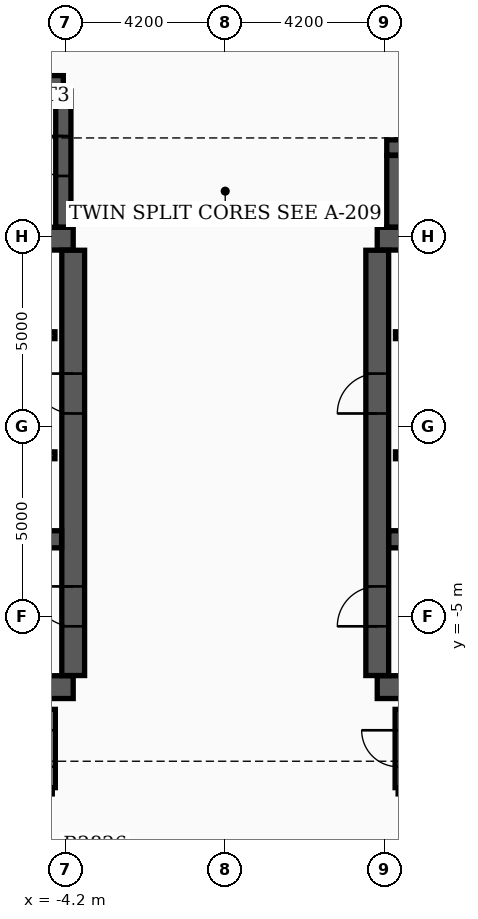
"""IFC4 building model, lengths in metres.
Left out: names, types, materials, properties, quantities, classifications, styles, units other than length and angle.
Written with IfcOpenShell. Run it as: python <this file> out.ifc"""

import sys

from ifc_helpers import new_model, si_unit, direction, frame, frame_2d, origin, place, context, subcontext, project, spatial, rectangle, extrude, element, fill, save


model = new_model("IFC4")
c1 = context("Model", 3, precision=1e-05, world=origin(), true_north=direction((0.0, 1.0)))
c2 = subcontext(c1, "Body", "Model", "MODEL_VIEW")
j1 = project(units=[si_unit("LENGTHUNIT", "METRE"), si_unit("PLANEANGLEUNIT", "RADIAN")], contexts=[c1])
p1 = place(None, origin())
s1 = spatial("IfcSite", under=j1, at=p1, CompositionType="ELEMENT")
p2 = place(p1, origin())
s2 = spatial("IfcBuilding", under=s1, at=p2, CompositionType="ELEMENT")
p3 = place(p2, frame((0.0, 0.0, 176.1)))
s3 = spatial("IfcBuildingStorey", under=s2, at=p3, CompositionType="ELEMENT", Elevation=176.1)
for number, where, z_axis, x_axis in (
    (1, (-12.4, -6.85, 0.0), (0.0, 0.0, 1.0), (1.0, 0.0, 0.0)),
    (2, (-12.4, 4.95, 0.0), (0.0, 0.0, 1.0), (1.0, 0.0, 0.0)),
):
    element("IfcWall", number, at=place(p3, frame(where, z_axis=z_axis, x_axis=x_axis)), inside=s3, PredefinedType="SHEAR", context=c2, shape_type="SweptSolid", body=[
        extrude(rectangle(XDim=8.4, YDim=0.6, at=frame_2d((4.2, 0.0))), origin(), (0.0, 0.0, 1.0), 3.7),
    ])
p4 = place(p3, frame((-4.0, -6.545, 0.0), z_axis=(0.0, 0.0, 1.0), x_axis=(0.0, 1.0, 0.0)))
e3 = element("IfcWall", 3, at=p4, inside=s3, PredefinedType="SHEAR", context=c2, shape_type="SweptSolid", body=[
    extrude(rectangle(XDim=11.19, YDim=0.6, at=frame_2d((5.595, 0.0))), origin(), (0.0, 0.0, 1.0), 3.7),
])
p5 = place(p4, frame((1.295, 0.0, 0.0)))
e4 = element("IfcOpeningElement", 4, at=p5, cuts=e3, PredefinedType="OPENING", context=c2, shape_type="SweptSolid", body=[
    extrude(rectangle(XDim=1.05, YDim=2.15, at=frame_2d((0.525, 1.075))), frame((0.0, 0.31, 0.0), z_axis=(0.0, -1.0, 0.0), x_axis=(1.0, 0.0, 0.0)), (0.0, 0.0, 1.0), 0.62),
])
p6 = place(p4, frame((6.895, 0.0, 0.0)))
e5 = element("IfcOpeningElement", 5, at=p6, cuts=e3, PredefinedType="OPENING", context=c2, shape_type="SweptSolid", body=[
    extrude(rectangle(XDim=1.05, YDim=2.15, at=frame_2d((0.525, 1.075))), frame((0.0, 0.31, 0.0), z_axis=(0.0, -1.0, 0.0), x_axis=(1.0, 0.0, 0.0)), (0.0, 0.0, 1.0), 0.62),
])
p7 = place(p3, frame((-12.095, -2.96, 0.0), z_axis=(0.0, 0.0, 1.0), x_axis=(1.0, 0.0, 0.0)))
e6 = element("IfcWall", 6, at=p7, inside=s3, PredefinedType="SHEAR", context=c2, shape_type="SweptSolid", body=[
    extrude(rectangle(XDim=7.79, YDim=0.45, at=frame_2d((3.895, 0.0))), origin(), (0.0, 0.0, 1.0), 3.7),
])
for number, where, z_axis, x_axis in (
    (7, (4.0, -6.85, 0.0), (0.0, 0.0, 1.0), (1.0, 0.0, 0.0)),
    (8, (4.0, 4.95, 0.0), (0.0, 0.0, 1.0), (1.0, 0.0, 0.0)),
):
    element("IfcWall", number, at=place(p3, frame(where, z_axis=z_axis, x_axis=x_axis)), inside=s3, PredefinedType="SHEAR", context=c2, shape_type="SweptSolid", body=[
        extrude(rectangle(XDim=8.4, YDim=0.6, at=frame_2d((4.2, 0.0))), origin(), (0.0, 0.0, 1.0), 3.7),
    ])
p8 = place(p3, frame((4.0, -6.545, 0.0), z_axis=(0.0, 0.0, 1.0), x_axis=(0.0, 1.0, 0.0)))
e9 = element("IfcWall", 9, at=p8, inside=s3, PredefinedType="SHEAR", context=c2, shape_type="SweptSolid", body=[
    extrude(rectangle(XDim=11.19, YDim=0.6, at=frame_2d((5.595, 0.0))), origin(), (0.0, 0.0, 1.0), 3.7),
])
p9 = place(p8, frame((1.295, 0.0, 0.0)))
e10 = element("IfcOpeningElement", 10, at=p9, cuts=e9, PredefinedType="OPENING", context=c2, shape_type="SweptSolid", body=[
    extrude(rectangle(XDim=1.05, YDim=2.15, at=frame_2d((0.525, 1.075))), frame((0.0, 0.31, 0.0), z_axis=(0.0, -1.0, 0.0), x_axis=(1.0, 0.0, 0.0)), (0.0, 0.0, 1.0), 0.62),
])
p10 = place(p8, frame((6.895, 0.0, 0.0)))
e11 = element("IfcOpeningElement", 11, at=p10, cuts=e9, PredefinedType="OPENING", context=c2, shape_type="SweptSolid", body=[
    extrude(rectangle(XDim=1.05, YDim=2.15, at=frame_2d((0.525, 1.075))), frame((0.0, 0.31, 0.0), z_axis=(0.0, -1.0, 0.0), x_axis=(1.0, 0.0, 0.0)), (0.0, 0.0, 1.0), 0.62),
])
p11 = place(p3, frame((4.305, -2.96, 0.0), z_axis=(0.0, 0.0, 1.0), x_axis=(1.0, 0.0, 0.0)))
e12 = element("IfcWall", 12, at=p11, inside=s3, PredefinedType="SHEAR", context=c2, shape_type="SweptSolid", body=[
    extrude(rectangle(XDim=7.79, YDim=0.45, at=frame_2d((3.895, 0.0))), origin(), (0.0, 0.0, 1.0), 3.7),
])
p12 = place(p3, frame((-12.22, 9.04, 0.0), z_axis=(0.0, 0.0, 1.0), x_axis=(1.0, 0.0, 0.0)))
e13 = element("IfcWall", 13, at=p12, inside=s3, PredefinedType="SHEAR", context=c2, shape_type="SweptSolid", body=[
    extrude(rectangle(XDim=7.96, YDim=0.4, at=frame_2d((3.98, 0.0))), origin(), (0.0, 0.0, 1.0), 3.7),
])
p13 = place(p3, frame((-4.26, 5.255, 0.0), z_axis=(0.0, 0.0, 1.0), x_axis=(0.0, 1.0, 0.0)))
e14 = element("IfcWall", 14, at=p13, inside=s3, PredefinedType="SHEAR", context=c2, shape_type="SweptSolid", body=[
    extrude(rectangle(XDim=3.58, YDim=0.4, at=frame_2d((1.79, 0.0))), origin(), (0.0, 0.0, 1.0), 3.7),
])
p14 = place(p13, frame((1.345, 0.0, 0.0)))
e15 = element("IfcOpeningElement", 15, at=p14, cuts=e14, PredefinedType="OPENING", context=c2, shape_type="SweptSolid", body=[
    extrude(rectangle(XDim=1.05, YDim=2.15, at=frame_2d((0.525, 1.075))), frame((0.0, 0.21, 0.0), z_axis=(0.0, -1.0, 0.0), x_axis=(1.0, 0.0, 0.0)), (0.0, 0.0, 1.0), 0.42),
])
p15 = place(p3, frame((4.45, 5.255, 0.0), z_axis=(0.0, 0.0, 1.0), x_axis=(0.0, 1.0, 0.0)))
e16 = element("IfcWall", 16, at=p15, inside=s3, PredefinedType="SHEAR", context=c2, shape_type="SweptSolid", body=[
    extrude(rectangle(XDim=1.885, YDim=0.4, at=frame_2d((0.942, 0.0))), origin(), (0.0, 0.0, 1.0), 3.7),
])
p16 = place(p3, frame((4.25, 7.35, 0.0), z_axis=(0.0, 0.0, 1.0), x_axis=(1.0, 0.0, 0.0)))
e17 = element("IfcWall", 17, at=p16, inside=s3, PredefinedType="SHEAR", context=c2, shape_type="SweptSolid", body=[
    extrude(rectangle(XDim=5.4, YDim=0.4, at=frame_2d((2.7, 0.0))), origin(), (0.0, 0.0, 1.0), 3.7),
])
p17 = place(p3, frame((-11.9, 2.41, 0.0), z_axis=(0.0, 0.0, 1.0), x_axis=(1.0, 0.0, 0.0)))
e18 = element("IfcWall", 18, at=p17, inside=s3, PredefinedType="SOLIDWALL", context=c2, shape_type="SweptSolid", body=[
    extrude(rectangle(XDim=7.42, YDim=0.18, at=frame_2d((3.71, 0.0))), origin(), (0.0, 0.0, 1.0), 2.96),
])
p18 = place(p17, frame((0.55, 0.0, 0.0)))
e19 = element("IfcOpeningElement", 19, at=p18, cuts=e18, PredefinedType="OPENING", context=c2, shape_type="SweptSolid", body=[
    extrude(rectangle(XDim=1.1, YDim=2.15, at=frame_2d((0.55, 1.075))), frame((0.0, 0.1, 0.0), z_axis=(0.0, -1.0, 0.0), x_axis=(1.0, 0.0, 0.0)), (0.0, 0.0, 1.0), 0.2),
])
p19 = place(p17, frame((4.9, 0.0, 0.0)))
e20 = element("IfcOpeningElement", 20, at=p19, cuts=e18, PredefinedType="OPENING", context=c2, shape_type="SweptSolid", body=[
    extrude(rectangle(XDim=0.88, YDim=2.1, at=frame_2d((0.44, 1.05))), frame((0.0, 0.1, 0.0), z_axis=(0.0, -1.0, 0.0), x_axis=(1.0, 0.0, 0.0)), (0.0, 0.0, 1.0), 0.2),
])
p20 = place(p3, frame((4.48, 2.41, 0.0), z_axis=(0.0, 0.0, 1.0), x_axis=(1.0, 0.0, 0.0)))
e21 = element("IfcWall", 21, at=p20, inside=s3, PredefinedType="SOLIDWALL", context=c2, shape_type="SweptSolid", body=[
    extrude(rectangle(XDim=7.42, YDim=0.18, at=frame_2d((3.71, 0.0))), origin(), (0.0, 0.0, 1.0), 2.96),
])
p21 = place(p20, frame((5.67, 0.0, 0.0)))
e22 = element("IfcOpeningElement", 22, at=p21, cuts=e21, PredefinedType="OPENING", context=c2, shape_type="SweptSolid", body=[
    extrude(rectangle(XDim=1.1, YDim=2.15, at=frame_2d((0.55, 1.075))), frame((0.0, 0.1, 0.0), z_axis=(0.0, -1.0, 0.0), x_axis=(1.0, 0.0, 0.0)), (0.0, 0.0, 1.0), 0.2),
])
p22 = place(p20, frame((1.6, 0.0, 0.0)))
e23 = element("IfcOpeningElement", 23, at=p22, cuts=e21, PredefinedType="OPENING", context=c2, shape_type="SweptSolid", body=[
    extrude(rectangle(XDim=0.88, YDim=2.1, at=frame_2d((0.44, 1.05))), frame((0.0, 0.1, 0.0), z_axis=(0.0, -1.0, 0.0), x_axis=(1.0, 0.0, 0.0)), (0.0, 0.0, 1.0), 0.2),
])
p23 = place(p3, frame((-11.9, -0.75, 0.0), z_axis=(0.0, 0.0, 1.0), x_axis=(1.0, 0.0, 0.0)))
e24 = element("IfcWall", 24, at=p23, inside=s3, PredefinedType="SOLIDWALL", context=c2, shape_type="SweptSolid", body=[
    extrude(rectangle(XDim=7.42, YDim=0.18, at=frame_2d((3.71, 0.0))), origin(), (0.0, 0.0, 1.0), 2.96),
])
p24 = place(p23, frame((0.45, 0.0, 0.0)))
e25 = element("IfcOpeningElement", 25, at=p24, cuts=e24, PredefinedType="OPENING", context=c2, shape_type="SweptSolid", body=[
    extrude(rectangle(XDim=1.1, YDim=2.15, at=frame_2d((0.55, 1.075))), frame((0.0, 0.1, 0.0), z_axis=(0.0, -1.0, 0.0), x_axis=(1.0, 0.0, 0.0)), (0.0, 0.0, 1.0), 0.2),
])
p25 = place(p23, frame((2.35, 0.0, 0.0)))
e26 = element("IfcOpeningElement", 26, at=p25, cuts=e24, PredefinedType="OPENING", context=c2, shape_type="SweptSolid", body=[
    extrude(rectangle(XDim=1.1, YDim=2.15, at=frame_2d((0.55, 1.075))), frame((0.0, 0.1, 0.0), z_axis=(0.0, -1.0, 0.0), x_axis=(1.0, 0.0, 0.0)), (0.0, 0.0, 1.0), 0.2),
])
p26 = place(p3, frame((4.48, -0.75, 0.0), z_axis=(0.0, 0.0, 1.0), x_axis=(1.0, 0.0, 0.0)))
e27 = element("IfcWall", 27, at=p26, inside=s3, PredefinedType="SOLIDWALL", context=c2, shape_type="SweptSolid", body=[
    extrude(rectangle(XDim=7.42, YDim=0.18, at=frame_2d((3.71, 0.0))), origin(), (0.0, 0.0, 1.0), 2.96),
])
p27 = place(p26, frame((0.52, 0.0, 0.0)))
e28 = element("IfcOpeningElement", 28, at=p27, cuts=e27, PredefinedType="OPENING", context=c2, shape_type="SweptSolid", body=[
    extrude(rectangle(XDim=1.1, YDim=2.15, at=frame_2d((0.55, 1.075))), frame((0.0, 0.1, 0.0), z_axis=(0.0, -1.0, 0.0), x_axis=(1.0, 0.0, 0.0)), (0.0, 0.0, 1.0), 0.2),
])
p28 = place(p3, frame((4.55, -9.58, 0.0), z_axis=(0.0, 0.0, 1.0), x_axis=(1.0, 0.0, 0.0)))
e29 = element("IfcWall", 29, at=p28, inside=s3, PredefinedType="PARTITIONING", context=c2, shape_type="SweptSolid", body=[
    extrude(rectangle(XDim=8.1, YDim=0.16, at=frame_2d((4.05, 0.0))), origin(), (0.0, 0.0, 1.0), 2.96),
])
p29 = place(p3, frame((4.55, -9.495, 0.0), z_axis=(0.0, 0.0, 1.0), x_axis=(0.0, 1.0, 0.0)))
e30 = element("IfcWall", 30, at=p29, inside=s3, PredefinedType="PARTITIONING", context=c2, shape_type="SweptSolid", body=[
    extrude(rectangle(XDim=2.06, YDim=0.16, at=frame_2d((1.03, 0.0))), origin(), (0.0, 0.0, 1.0), 2.96),
])
p30 = place(p29, frame((0.55, 0.0, 0.0)))
e31 = element("IfcOpeningElement", 31, at=p30, cuts=e30, PredefinedType="OPENING", context=c2, shape_type="SweptSolid", body=[
    extrude(rectangle(XDim=0.96, YDim=2.15, at=frame_2d((0.48, 1.075))), frame((0.0, 0.09, 0.0), z_axis=(0.0, -1.0, 0.0), x_axis=(1.0, 0.0, 0.0)), (0.0, 0.0, 1.0), 0.18),
])
p31 = place(p3, frame((-4.55, -9.495, 0.0), z_axis=(0.0, 0.0, 1.0), x_axis=(0.0, 1.0, 0.0)))
e32 = element("IfcWall", 32, at=p31, inside=s3, PredefinedType="PARTITIONING", context=c2, shape_type="SweptSolid", body=[
    extrude(rectangle(XDim=2.06, YDim=0.16, at=frame_2d((1.03, 0.0))), origin(), (0.0, 0.0, 1.0), 2.96),
])
p32 = place(p31, frame((0.55, 0.0, 0.0)))
e33 = element("IfcOpeningElement", 33, at=p32, cuts=e32, PredefinedType="OPENING", context=c2, shape_type="SweptSolid", body=[
    extrude(rectangle(XDim=0.96, YDim=2.15, at=frame_2d((0.48, 1.075))), frame((0.0, 0.09, 0.0), z_axis=(0.0, -1.0, 0.0), x_axis=(1.0, 0.0, 0.0)), (0.0, 0.0, 1.0), 0.18),
])
p33 = place(p5, origin())
e34 = element("IfcDoor", 34, at=p33, inside=s3, OperationType="SINGLE_SWING_RIGHT", PredefinedType="DOOR", context=c2, shape_type="SweptSolid", body=[
    extrude(rectangle(XDim=1.05, YDim=2.15, at=frame_2d((0.525, 1.075))), frame((0.0, 0.025, 0.0), z_axis=(0.0, -1.0, 0.0), x_axis=(1.0, 0.0, 0.0)), (0.0, 0.0, 1.0), 0.05),
])
fill(e4, e34)
p34 = place(p9, origin())
e35 = element("IfcDoor", 35, at=p34, inside=s3, OperationType="SINGLE_SWING_LEFT", PredefinedType="DOOR", context=c2, shape_type="SweptSolid", body=[
    extrude(rectangle(XDim=1.05, YDim=2.15, at=frame_2d((0.525, 1.075))), frame((0.0, 0.025, 0.0), z_axis=(0.0, -1.0, 0.0), x_axis=(1.0, 0.0, 0.0)), (0.0, 0.0, 1.0), 0.05),
])
fill(e10, e35)
p35 = place(p6, origin())
e36 = element("IfcDoor", 36, at=p35, inside=s3, OperationType="SINGLE_SWING_RIGHT", PredefinedType="DOOR", context=c2, shape_type="SweptSolid", body=[
    extrude(rectangle(XDim=1.05, YDim=2.15, at=frame_2d((0.525, 1.075))), frame((0.0, 0.025, 0.0), z_axis=(0.0, -1.0, 0.0), x_axis=(1.0, 0.0, 0.0)), (0.0, 0.0, 1.0), 0.05),
])
fill(e5, e36)
p36 = place(p10, origin())
e37 = element("IfcDoor", 37, at=p36, inside=s3, OperationType="SINGLE_SWING_LEFT", PredefinedType="DOOR", context=c2, shape_type="SweptSolid", body=[
    extrude(rectangle(XDim=1.05, YDim=2.15, at=frame_2d((0.525, 1.075))), frame((0.0, 0.025, 0.0), z_axis=(0.0, -1.0, 0.0), x_axis=(1.0, 0.0, 0.0)), (0.0, 0.0, 1.0), 0.05),
])
fill(e11, e37)
p37 = place(p14, origin())
e38 = element("IfcDoor", 38, at=p37, inside=s3, OperationType="SINGLE_SWING_RIGHT", PredefinedType="DOOR", context=c2, shape_type="SweptSolid", body=[
    extrude(rectangle(XDim=1.05, YDim=2.15, at=frame_2d((0.525, 1.075))), frame((0.0, 0.025, 0.0), z_axis=(0.0, -1.0, 0.0), x_axis=(1.0, 0.0, 0.0)), (0.0, 0.0, 1.0), 0.05),
])
fill(e15, e38)
p38 = place(p30, origin())
e39 = element("IfcDoor", 39, at=p38, inside=s3, OperationType="SINGLE_SWING_RIGHT", PredefinedType="DOOR", context=c2, shape_type="SweptSolid", body=[
    extrude(rectangle(XDim=0.96, YDim=2.15, at=frame_2d((0.48, 1.075))), frame((0.0, 0.025, 0.0), z_axis=(0.0, -1.0, 0.0), x_axis=(1.0, 0.0, 0.0)), (0.0, 0.0, 1.0), 0.05),
])
fill(e31, e39)
p39 = place(p32, origin())
e40 = element("IfcDoor", 40, at=p39, inside=s3, OperationType="SINGLE_SWING_LEFT", PredefinedType="DOOR", context=c2, shape_type="SweptSolid", body=[
    extrude(rectangle(XDim=0.96, YDim=2.15, at=frame_2d((0.48, 1.075))), frame((0.0, 0.025, 0.0), z_axis=(0.0, -1.0, 0.0), x_axis=(1.0, 0.0, 0.0)), (0.0, 0.0, 1.0), 0.05),
])
fill(e33, e40)
save(model, sys.argv[1])
